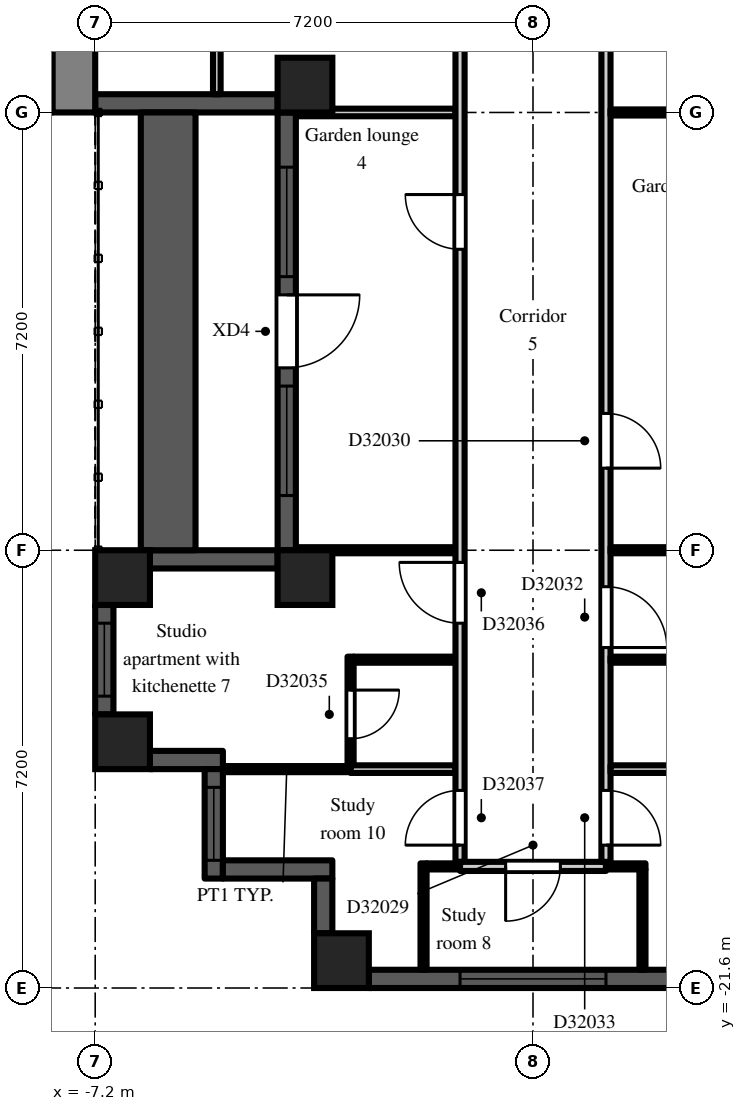
"""IFC4 building model, lengths in metres.
Left out: names, types, materials, properties, quantities, classifications, styles, units other than length and angle.
Written with IfcOpenShell. Run it as: python <this file> out.ifc"""

import sys

from ifc_helpers import new_model, si_unit, direction, frame, frame_2d, origin, origin_2d, place, context, subcontext, project, spatial, rectangle, extrude, element, fill, save


model = new_model("IFC4")
c1 = context("Model", 3, precision=1e-05, world=origin(), true_north=direction((0.0, 1.0)))
c2 = subcontext(c1, "Body", "Model", "MODEL_VIEW")
j1 = project(units=[si_unit("LENGTHUNIT", "METRE"), si_unit("PLANEANGLEUNIT", "RADIAN")], contexts=[c1])
p1 = place(None, origin())
s1 = spatial("IfcSite", under=j1, at=p1, CompositionType="ELEMENT")
p2 = place(p1, origin())
s2 = spatial("IfcBuilding", under=s1, at=p2, CompositionType="ELEMENT")
p3 = place(p2, frame((0.0, 0.0, 225.9)))
s3 = spatial("IfcBuildingStorey", under=s2, at=p3, CompositionType="ELEMENT", Elevation=225.9)
for number, where, z_axis, x_axis in (
    (1, (-6.75, -17.55, 0.0), (0.0, 0.0, 1.0), (1.0, 0.0, 0.0)),
    (2, (-6.75, -14.85, 0.0), (0.0, 0.0, 1.0), (1.0, 0.0, 0.0)),
    (3, (-3.75, -14.85, 0.0), (0.0, 0.0, 1.0), (1.0, 0.0, 0.0)),
    (4, (-3.75, -6.75, 0.0), (0.0, 0.0, 1.0), (1.0, 0.0, 0.0)),
    (5, (-3.15, -21.15, 0.0), (0.0, 0.0, 1.0), (1.0, 0.0, 0.0)),
):
    element("IfcColumn", number, at=place(p3, frame(where, z_axis=z_axis, x_axis=x_axis)), inside=s3, PredefinedType="COLUMN", context=c2, shape_type="SweptSolid", body=[
        extrude(rectangle(XDim=0.9, YDim=0.9, at=origin_2d()), origin(), (0.0, 0.0, 1.0), 3.0),
    ])
p4 = place(p3, frame((-7.2, -7.05, 0.0), z_axis=(0.0, 0.0, 1.0), x_axis=(1.0, 0.0, 0.0)))
e6 = element("IfcWall", 6, at=p4, inside=s3, PredefinedType="SOLIDWALL", context=c2, shape_type="SweptSolid", body=[
    extrude(rectangle(XDim=3.0, YDim=0.3, at=frame_2d((1.5, 0.0))), origin(), (0.0, 0.0, 1.0), 2.3),
])
p5 = place(p3, frame((-4.05, -7.2, 0.0), z_axis=(0.0, 0.0, 1.0), x_axis=(0.0, -1.0, 0.0)))
e7 = element("IfcWall", 7, at=p5, inside=s3, PredefinedType="SOLIDWALL", context=c2, shape_type="SweptSolid", body=[
    extrude(rectangle(XDim=7.2, YDim=0.3, at=frame_2d((3.6, 0.0))), origin(), (0.0, 0.0, 1.0), 2.3),
])
p6 = place(p5, frame((3.0, 0.0, 0.0)))
e8 = element("IfcOpeningElement", 8, at=p6, cuts=e7, PredefinedType="OPENING", context=c2, shape_type="SweptSolid", body=[
    extrude(rectangle(XDim=1.2, YDim=2.05, at=frame_2d((0.6, 1.025))), frame((0.0, 0.16, 0.0), z_axis=(0.0, -1.0, 0.0), x_axis=(1.0, 0.0, 0.0)), (0.0, 0.0, 1.0), 0.32),
])
p7 = place(p5, frame((0.9, 0.0, 0.2)))
e9 = element("IfcOpeningElement", 9, at=p7, cuts=e7, PredefinedType="OPENING", context=c2, shape_type="SweptSolid", body=[
    extrude(rectangle(XDim=1.8, YDim=1.85, at=frame_2d((0.9, 0.925))), frame((0.0, 0.16, 0.0), z_axis=(0.0, -1.0, 0.0), x_axis=(1.0, 0.0, 0.0)), (0.0, 0.0, 1.0), 0.32),
])
p8 = place(p5, frame((4.5, 0.0, 0.2)))
e10 = element("IfcOpeningElement", 10, at=p8, cuts=e7, PredefinedType="OPENING", context=c2, shape_type="SweptSolid", body=[
    extrude(rectangle(XDim=1.8, YDim=1.85, at=frame_2d((0.9, 0.925))), frame((0.0, 0.16, 0.0), z_axis=(0.0, -1.0, 0.0), x_axis=(1.0, 0.0, 0.0)), (0.0, 0.0, 1.0), 0.32),
])
p9 = place(p3, frame((-4.2, -14.55, 0.0), z_axis=(0.0, 0.0, 1.0), x_axis=(-1.0, 0.0, 0.0)))
e11 = element("IfcWall", 11, at=p9, inside=s3, PredefinedType="SOLIDWALL", context=c2, shape_type="SweptSolid", body=[
    extrude(rectangle(XDim=2.1, YDim=0.3, at=frame_2d((1.05, 0.0))), origin(), (0.0, 0.0, 1.0), 2.3),
])
p10 = place(p3, frame((-7.05, -15.3, 0.0), z_axis=(0.0, 0.0, 1.0), x_axis=(0.0, -1.0, 0.0)))
e12 = element("IfcWall", 12, at=p10, inside=s3, PredefinedType="SOLIDWALL", context=c2, shape_type="SweptSolid", body=[
    extrude(rectangle(XDim=1.8, YDim=0.3, at=frame_2d((0.9, 0.0))), origin(), (0.0, 0.0, 1.0), 2.3),
])
p11 = place(p10, frame((0.3, 0.0, 0.2)))
e13 = element("IfcOpeningElement", 13, at=p11, cuts=e12, PredefinedType="OPENING", context=c2, shape_type="SweptSolid", body=[
    extrude(rectangle(XDim=1.2, YDim=1.85, at=frame_2d((0.6, 0.925))), frame((0.0, 0.16, 0.0), z_axis=(0.0, -1.0, 0.0), x_axis=(1.0, 0.0, 0.0)), (0.0, 0.0, 1.0), 0.32),
])
p12 = place(p3, frame((-6.3, -17.85, 0.0), z_axis=(0.0, 0.0, 1.0), x_axis=(1.0, 0.0, 0.0)))
e14 = element("IfcWall", 14, at=p12, inside=s3, PredefinedType="SOLIDWALL", context=c2, shape_type="SweptSolid", body=[
    extrude(rectangle(XDim=1.2, YDim=0.3, at=frame_2d((0.6, 0.0))), origin(), (0.0, 0.0, 1.0), 2.6),
])
p13 = place(p3, frame((-5.25, -18.0, 0.0), z_axis=(0.0, 0.0, 1.0), x_axis=(0.0, -1.0, 0.0)))
e15 = element("IfcWall", 15, at=p13, inside=s3, PredefinedType="SOLIDWALL", context=c2, shape_type="SweptSolid", body=[
    extrude(rectangle(XDim=1.8, YDim=0.3, at=frame_2d((0.9, 0.0))), origin(), (0.0, 0.0, 1.0), 2.6),
])
p14 = place(p13, frame((0.3, 0.0, 0.2)))
e16 = element("IfcOpeningElement", 16, at=p14, cuts=e15, PredefinedType="OPENING", context=c2, shape_type="SweptSolid", body=[
    extrude(rectangle(XDim=1.2, YDim=1.85, at=frame_2d((0.6, 0.925))), frame((0.0, 0.16, 0.0), z_axis=(0.0, -1.0, 0.0), x_axis=(1.0, 0.0, 0.0)), (0.0, 0.0, 1.0), 0.32),
])
p15 = place(p3, frame((-5.1, -19.65, 0.0), z_axis=(0.0, 0.0, 1.0), x_axis=(1.0, 0.0, 0.0)))
e17 = element("IfcWall", 17, at=p15, inside=s3, PredefinedType="SOLIDWALL", context=c2, shape_type="SweptSolid", body=[
    extrude(rectangle(XDim=1.8, YDim=0.3, at=frame_2d((0.9, 0.0))), origin(), (0.0, 0.0, 1.0), 2.6),
])
p16 = place(p3, frame((-3.45, -19.8, 0.0), z_axis=(0.0, 0.0, 1.0), x_axis=(0.0, -1.0, 0.0)))
e18 = element("IfcWall", 18, at=p16, inside=s3, PredefinedType="SOLIDWALL", context=c2, shape_type="SweptSolid", body=[
    extrude(rectangle(XDim=0.9, YDim=0.3, at=frame_2d((0.45, 0.0))), origin(), (0.0, 0.0, 1.0), 2.6),
])
p17 = place(p3, frame((-2.7, -21.45, 0.0), z_axis=(0.0, 0.0, 1.0), x_axis=(1.0, 0.0, 0.0)))
e19 = element("IfcWall", 19, at=p17, inside=s3, PredefinedType="SOLIDWALL", context=c2, shape_type="SweptSolid", body=[
    extrude(rectangle(XDim=5.4, YDim=0.3, at=frame_2d((2.7, 0.0))), origin(), (0.0, 0.0, 1.0), 2.3),
])
p18 = place(p17, frame((1.5, 0.0, 0.2)))
e20 = element("IfcOpeningElement", 20, at=p18, cuts=e19, PredefinedType="OPENING", context=c2, shape_type="SweptSolid", body=[
    extrude(rectangle(XDim=2.4, YDim=1.85, at=frame_2d((1.2, 0.925))), frame((0.0, 0.16, 0.0), z_axis=(0.0, -1.0, 0.0), x_axis=(1.0, 0.0, 0.0)), (0.0, 0.0, 1.0), 0.32),
])
p19 = place(p3, frame((-6.0, -14.4, 0.0), z_axis=(0.0, 0.0, 1.0), x_axis=(0.0, 1.0, 0.0)))
e21 = element("IfcWall", 21, at=p19, inside=s3, PredefinedType="PARAPET", context=c2, shape_type="SweptSolid", body=[
    extrude(rectangle(XDim=7.2, YDim=0.9, at=frame_2d((3.6, 0.0))), origin(), (0.0, 0.0, 1.0), 0.8),
])
p20 = place(p3, frame((-7.55, -7.2, 0.0), z_axis=(0.0, 0.0, 1.0), x_axis=(0.0, 1.0, 0.0)))
e22 = element("IfcWall", 22, at=p20, inside=s3, PredefinedType="SHEAR", context=c2, shape_type="SweptSolid", body=[
    extrude(rectangle(XDim=14.4, YDim=0.7, at=frame_2d((7.2, 0.0))), origin(), (0.0, 0.0, 1.0), 2.6),
])
p21 = place(p20, frame((6.0, 0.0, 0.0)))
e23 = element("IfcOpeningElement", 23, at=p21, cuts=e22, PredefinedType="OPENING", context=c2, shape_type="SweptSolid", body=[
    extrude(rectangle(XDim=2.4, YDim=2.2, at=frame_2d((1.2, 1.1))), frame((0.0, 0.36, 0.0), z_axis=(0.0, -1.0, 0.0), x_axis=(1.0, 0.0, 0.0)), (0.0, 0.0, 1.0), 0.72),
])
p22 = place(p3, frame((-5.2, -6.9, 0.0), z_axis=(0.0, 0.0, 1.0), x_axis=(0.0, 1.0, 0.0)))
e24 = element("IfcWall", 24, at=p22, inside=s3, PredefinedType="PARTITIONING", context=c2, shape_type="SweptSolid", body=[
    extrude(rectangle(XDim=5.625, YDim=0.125, at=frame_2d((2.812, 0.0))), origin(), (0.0, 0.0, 1.0), 2.6),
])
p23 = place(p3, frame((-5.1, -18.0, 0.0), z_axis=(0.0, 0.0, 1.0), x_axis=(1.0, 0.0, 0.0)))
e25 = element("IfcWall", 25, at=p23, inside=s3, PredefinedType="PARTITIONING", context=c2, shape_type="SweptSolid", body=[
    extrude(rectangle(XDim=2.1, YDim=0.1, at=frame_2d((1.05, 0.0))), origin(), (0.0, 0.0, 1.0), 2.6),
])
p24 = place(p3, frame((-3.9, -14.4, 0.0), z_axis=(0.0, 0.0, 1.0), x_axis=(1.0, 0.0, 0.0)))
e26 = element("IfcWall", 26, at=p24, inside=s3, PredefinedType="PARTITIONING", context=c2, shape_type="SweptSolid", body=[
    extrude(rectangle(XDim=2.625, YDim=0.1, at=frame_2d((1.312, 0.0))), origin(), (0.0, 0.0, 1.0), 2.6),
])
p25 = place(p3, frame((-3.9, -7.2, 0.0), z_axis=(0.0, 0.0, 1.0), x_axis=(1.0, 0.0, 0.0)))
e27 = element("IfcWall", 27, at=p25, inside=s3, PredefinedType="PARTITIONING", context=c2, shape_type="SweptSolid", body=[
    extrude(rectangle(XDim=2.625, YDim=0.125, at=frame_2d((1.312, 0.0))), origin(), (0.0, 0.0, 1.0), 2.6),
])
p26 = place(p3, frame((-3.0, -17.938, 0.0), z_axis=(0.0, 0.0, 1.0), x_axis=(0.0, 1.0, 0.0)))
e28 = element("IfcWall", 28, at=p26, inside=s3, PredefinedType="PARTITIONING", context=c2, shape_type="SweptSolid", body=[
    extrude(rectangle(XDim=1.788, YDim=0.1, at=frame_2d((0.894, 0.0))), origin(), (0.0, 0.0, 1.0), 2.6),
])
p27 = place(p26, frame((0.438, 0.0, 0.0)))
e29 = element("IfcOpeningElement", 29, at=p27, cuts=e28, PredefinedType="OPENING", context=c2, shape_type="SweptSolid", body=[
    extrude(rectangle(XDim=0.8, YDim=2.1, at=frame_2d((0.4, 1.05))), frame((0.0, 0.06, 0.0), z_axis=(0.0, -1.0, 0.0), x_axis=(1.0, 0.0, 0.0)), (0.0, 0.0, 1.0), 0.12),
])
p28 = place(p3, frame((-3.0, -18.0, 0.0), z_axis=(0.0, 0.0, 1.0), x_axis=(1.0, 0.0, 0.0)))
e30 = element("IfcWall", 30, at=p28, inside=s3, PredefinedType="PARTITIONING", context=c2, shape_type="SweptSolid", body=[
    extrude(rectangle(XDim=1.725, YDim=0.125, at=frame_2d((0.863, 0.0))), origin(), (0.0, 0.0, 1.0), 2.6),
])
p29 = place(p3, frame((-2.95, -16.2, 0.0), z_axis=(0.0, 0.0, 1.0), x_axis=(1.0, 0.0, 0.0)))
e31 = element("IfcWall", 31, at=p29, inside=s3, PredefinedType="PARTITIONING", context=c2, shape_type="SweptSolid", body=[
    extrude(rectangle(XDim=1.675, YDim=0.1, at=frame_2d((0.837, 0.0))), origin(), (0.0, 0.0, 1.0), 2.6),
])
p30 = place(p3, frame((-1.8, -21.3, 0.0), z_axis=(0.0, 0.0, 1.0), x_axis=(0.0, 1.0, 0.0)))
e32 = element("IfcWall", 32, at=p30, inside=s3, PredefinedType="PARTITIONING", context=c2, shape_type="SweptSolid", body=[
    extrude(rectangle(XDim=1.75, YDim=0.1, at=frame_2d((0.875, 0.0))), origin(), (0.0, 0.0, 1.0), 2.6),
])
p31 = place(p3, frame((-1.75, -19.6, 0.0), z_axis=(0.0, 0.0, 1.0), x_axis=(1.0, 0.0, 0.0)))
e33 = element("IfcWall", 33, at=p31, inside=s3, PredefinedType="PARTITIONING", context=c2, shape_type="SweptSolid", body=[
    extrude(rectangle(XDim=0.55, YDim=0.1, at=frame_2d((0.275, 0.0))), origin(), (0.0, 0.0, 1.0), 2.6),
])
p32 = place(p3, frame((-1.2, -19.525, 0.0), z_axis=(0.0, 0.0, 1.0), x_axis=(0.0, 1.0, 0.0)))
e34 = element("IfcWall", 34, at=p32, inside=s3, PredefinedType="PARTITIONING", context=c2, shape_type="SweptSolid", body=[
    extrude(rectangle(XDim=18.25, YDim=0.15, at=frame_2d((9.125, 0.0))), origin(), (0.0, 0.0, 1.0), 2.6),
])
p33 = place(p32, frame((14.875, 0.0, 0.0)))
e35 = element("IfcOpeningElement", 35, at=p33, cuts=e34, PredefinedType="OPENING", context=c2, shape_type="SweptSolid", body=[
    extrude(rectangle(XDim=0.9, YDim=2.1, at=frame_2d((0.45, 1.05))), frame((0.0, 0.085, 0.0), z_axis=(0.0, -1.0, 0.0), x_axis=(1.0, 0.0, 0.0)), (0.0, 0.0, 1.0), 0.17),
])
p34 = place(p32, frame((10.075, 0.0, 0.0)))
e36 = element("IfcOpeningElement", 36, at=p34, cuts=e34, PredefinedType="OPENING", context=c2, shape_type="SweptSolid", body=[
    extrude(rectangle(XDim=0.9, YDim=2.1, at=frame_2d((0.45, 1.05))), frame((0.0, 0.085, 0.0), z_axis=(0.0, -1.0, 0.0), x_axis=(1.0, 0.0, 0.0)), (0.0, 0.0, 1.0), 0.17),
])
p35 = place(p32, frame((3.925, 0.0, 0.0)))
e37 = element("IfcOpeningElement", 37, at=p35, cuts=e34, PredefinedType="OPENING", context=c2, shape_type="SweptSolid", body=[
    extrude(rectangle(XDim=1.0, YDim=2.1, at=frame_2d((0.5, 1.05))), frame((0.0, 0.085, 0.0), z_axis=(0.0, -1.0, 0.0), x_axis=(1.0, 0.0, 0.0)), (0.0, 0.0, 1.0), 0.17),
])
p36 = place(p32, frame((0.275, 0.0, 0.0)))
e38 = element("IfcOpeningElement", 38, at=p36, cuts=e34, PredefinedType="OPENING", context=c2, shape_type="SweptSolid", body=[
    extrude(rectangle(XDim=0.9, YDim=2.1, at=frame_2d((0.45, 1.05))), frame((0.0, 0.085, 0.0), z_axis=(0.0, -1.0, 0.0), x_axis=(1.0, 0.0, 0.0)), (0.0, 0.0, 1.0), 0.17),
])
p37 = place(p3, frame((-1.2, -19.6, 0.0), z_axis=(0.0, 0.0, 1.0), x_axis=(1.0, 0.0, 0.0)))
e39 = element("IfcWall", 39, at=p37, inside=s3, PredefinedType="PARTITIONING", context=c2, shape_type="SweptSolid", body=[
    extrude(rectangle(XDim=2.4, YDim=0.15, at=frame_2d((1.2, 0.0))), origin(), (0.0, 0.0, 1.0), 2.6),
])
p38 = place(p37, frame((0.75, 0.0, 0.0)))
e40 = element("IfcOpeningElement", 40, at=p38, cuts=e39, PredefinedType="OPENING", context=c2, shape_type="SweptSolid", body=[
    extrude(rectangle(XDim=0.9, YDim=2.1, at=frame_2d((0.45, 1.05))), frame((0.0, 0.085, 0.0), z_axis=(0.0, -1.0, 0.0), x_axis=(1.0, 0.0, 0.0)), (0.0, 0.0, 1.0), 0.17),
])
p39 = place(p3, frame((1.2, -19.525, 0.0), z_axis=(0.0, 0.0, 1.0), x_axis=(0.0, 1.0, 0.0)))
e41 = element("IfcWall", 41, at=p39, inside=s3, PredefinedType="PARTITIONING", context=c2, shape_type="SweptSolid", body=[
    extrude(rectangle(XDim=18.4, YDim=0.15, at=frame_2d((9.2, 0.0))), origin(), (0.0, 0.0, 1.0), 2.6),
])
p40 = place(p39, frame((14.875, 0.0, 0.0)))
e42 = element("IfcOpeningElement", 42, at=p40, cuts=e41, PredefinedType="OPENING", context=c2, shape_type="SweptSolid", body=[
    extrude(rectangle(XDim=0.9, YDim=2.1, at=frame_2d((0.45, 1.05))), frame((0.0, 0.085, 0.0), z_axis=(0.0, -1.0, 0.0), x_axis=(1.0, 0.0, 0.0)), (0.0, 0.0, 1.0), 0.17),
])
p41 = place(p39, frame((6.475, 0.0, 0.0)))
e43 = element("IfcOpeningElement", 43, at=p41, cuts=e41, PredefinedType="OPENING", context=c2, shape_type="SweptSolid", body=[
    extrude(rectangle(XDim=0.9, YDim=2.1, at=frame_2d((0.45, 1.05))), frame((0.0, 0.085, 0.0), z_axis=(0.0, -1.0, 0.0), x_axis=(1.0, 0.0, 0.0)), (0.0, 0.0, 1.0), 0.17),
])
p42 = place(p39, frame((3.525, 0.0, 0.0)))
e44 = element("IfcOpeningElement", 44, at=p42, cuts=e41, PredefinedType="OPENING", context=c2, shape_type="SweptSolid", body=[
    extrude(rectangle(XDim=1.0, YDim=2.1, at=frame_2d((0.5, 1.05))), frame((0.0, 0.085, 0.0), z_axis=(0.0, -1.0, 0.0), x_axis=(1.0, 0.0, 0.0)), (0.0, 0.0, 1.0), 0.17),
])
p43 = place(p39, frame((0.275, 0.0, 0.0)))
e45 = element("IfcOpeningElement", 45, at=p43, cuts=e41, PredefinedType="OPENING", context=c2, shape_type="SweptSolid", body=[
    extrude(rectangle(XDim=0.9, YDim=2.1, at=frame_2d((0.45, 1.05))), frame((0.0, 0.085, 0.0), z_axis=(0.0, -1.0, 0.0), x_axis=(1.0, 0.0, 0.0)), (0.0, 0.0, 1.0), 0.17),
])
p44 = place(p3, frame((1.2, -19.6, 0.0), z_axis=(0.0, 0.0, 1.0), x_axis=(1.0, 0.0, 0.0)))
e46 = element("IfcWall", 46, at=p44, inside=s3, PredefinedType="PARTITIONING", context=c2, shape_type="SweptSolid", body=[
    extrude(rectangle(XDim=0.65, YDim=0.1, at=frame_2d((0.325, 0.0))), origin(), (0.0, 0.0, 1.0), 2.6),
])
p45 = place(p3, frame((1.275, -18.0, 0.0), z_axis=(0.0, 0.0, 1.0), x_axis=(1.0, 0.0, 0.0)))
e47 = element("IfcWall", 47, at=p45, inside=s3, PredefinedType="PARTITIONING", context=c2, shape_type="SweptSolid", body=[
    extrude(rectangle(XDim=1.725, YDim=0.125, at=frame_2d((0.863, 0.0))), origin(), (0.0, 0.0, 1.0), 2.6),
])
p46 = place(p3, frame((1.275, -16.2, 0.0), z_axis=(0.0, 0.0, 1.0), x_axis=(1.0, 0.0, 0.0)))
e48 = element("IfcWall", 48, at=p46, inside=s3, PredefinedType="PARTITIONING", context=c2, shape_type="SweptSolid", body=[
    extrude(rectangle(XDim=1.775, YDim=0.1, at=frame_2d((0.888, 0.0))), origin(), (0.0, 0.0, 1.0), 2.6),
])
for number, where, z_axis, x_axis in (
    (49, (1.275, -14.4, 0.0), (0.0, 0.0, 1.0), (1.0, 0.0, 0.0)),
    (50, (1.275, -7.2, 0.0), (0.0, 0.0, 1.0), (1.0, 0.0, 0.0)),
):
    element("IfcWall", number, at=place(p3, frame(where, z_axis=z_axis, x_axis=x_axis)), inside=s3, PredefinedType="PARTITIONING", context=c2, shape_type="SweptSolid", body=[
        extrude(rectangle(XDim=2.625, YDim=0.1, at=frame_2d((1.312, 0.0))), origin(), (0.0, 0.0, 1.0), 2.6),
    ])
p47 = place(p3, frame((1.8, -21.3, 0.0), z_axis=(0.0, 0.0, 1.0), x_axis=(0.0, 1.0, 0.0)))
e51 = element("IfcWall", 51, at=p47, inside=s3, PredefinedType="PARTITIONING", context=c2, shape_type="SweptSolid", body=[
    extrude(rectangle(XDim=1.65, YDim=0.1, at=frame_2d((0.825, 0.0))), origin(), (0.0, 0.0, 1.0), 2.6),
])
p48 = place(p6, origin())
e52 = element("IfcDoor", 52, at=p48, inside=s3, OperationType="SINGLE_SWING_LEFT", PredefinedType="DOOR", context=c2, shape_type="SweptSolid", body=[
    extrude(rectangle(XDim=1.2, YDim=2.05, at=frame_2d((0.6, 1.025))), frame((0.0, 0.025, 0.0), z_axis=(0.0, -1.0, 0.0), x_axis=(1.0, 0.0, 0.0)), (0.0, 0.0, 1.0), 0.05),
])
fill(e8, e52)
p49 = place(p7, origin())
e53 = element("IfcWindow", 53, at=p49, inside=s3, PartitioningType="SINGLE_PANEL", PredefinedType="WINDOW", context=c2, shape_type="SweptSolid", body=[
    extrude(rectangle(XDim=1.8, YDim=1.85, at=frame_2d((0.9, 0.925))), frame((0.0, 0.03, 0.0), z_axis=(0.0, -1.0, 0.0), x_axis=(1.0, 0.0, 0.0)), (0.0, 0.0, 1.0), 0.06),
])
fill(e9, e53)
p50 = place(p8, origin())
e54 = element("IfcWindow", 54, at=p50, inside=s3, PartitioningType="SINGLE_PANEL", PredefinedType="WINDOW", context=c2, shape_type="SweptSolid", body=[
    extrude(rectangle(XDim=1.8, YDim=1.85, at=frame_2d((0.9, 0.925))), frame((0.0, 0.03, 0.0), z_axis=(0.0, -1.0, 0.0), x_axis=(1.0, 0.0, 0.0)), (0.0, 0.0, 1.0), 0.06),
])
fill(e10, e54)
p51 = place(p11, origin())
e55 = element("IfcWindow", 55, at=p51, inside=s3, PartitioningType="SINGLE_PANEL", PredefinedType="WINDOW", context=c2, shape_type="SweptSolid", body=[
    extrude(rectangle(XDim=1.2, YDim=1.85, at=frame_2d((0.6, 0.925))), frame((0.0, 0.03, 0.0), z_axis=(0.0, -1.0, 0.0), x_axis=(1.0, 0.0, 0.0)), (0.0, 0.0, 1.0), 0.06),
])
fill(e13, e55)
p52 = place(p14, origin())
e56 = element("IfcWindow", 56, at=p52, inside=s3, PartitioningType="SINGLE_PANEL", PredefinedType="WINDOW", context=c2, shape_type="SweptSolid", body=[
    extrude(rectangle(XDim=1.2, YDim=1.85, at=frame_2d((0.6, 0.925))), frame((0.0, 0.03, 0.0), z_axis=(0.0, -1.0, 0.0), x_axis=(1.0, 0.0, 0.0)), (0.0, 0.0, 1.0), 0.06),
])
fill(e16, e56)
p53 = place(p18, origin())
e57 = element("IfcWindow", 57, at=p53, inside=s3, PartitioningType="SINGLE_PANEL", PredefinedType="WINDOW", context=c2, shape_type="SweptSolid", body=[
    extrude(rectangle(XDim=2.4, YDim=1.85, at=frame_2d((1.2, 0.925))), frame((0.0, 0.03, 0.0), z_axis=(0.0, -1.0, 0.0), x_axis=(1.0, 0.0, 0.0)), (0.0, 0.0, 1.0), 0.06),
])
fill(e20, e57)
p54 = place(p38, frame((0.9, 0.0, 0.0), z_axis=(0.0, 0.0, 1.0), x_axis=(-1.0, 0.0, 0.0)))
e58 = element("IfcDoor", 58, at=p54, inside=s3, OperationType="SINGLE_SWING_RIGHT", PredefinedType="DOOR", context=c2, shape_type="SweptSolid", body=[
    extrude(rectangle(XDim=0.9, YDim=2.1, at=frame_2d((0.45, 1.05))), frame((0.0, 0.025, 0.0), z_axis=(0.0, -1.0, 0.0), x_axis=(1.0, 0.0, 0.0)), (0.0, 0.0, 1.0), 0.05),
])
fill(e40, e58)
p55 = place(p41, frame((0.9, 0.0, 0.0), z_axis=(0.0, 0.0, 1.0), x_axis=(-1.0, 0.0, 0.0)))
e59 = element("IfcDoor", 59, at=p55, inside=s3, OperationType="SINGLE_SWING_RIGHT", PredefinedType="DOOR", context=c2, shape_type="SweptSolid", body=[
    extrude(rectangle(XDim=0.9, YDim=2.1, at=frame_2d((0.45, 1.05))), frame((0.0, 0.025, 0.0), z_axis=(0.0, -1.0, 0.0), x_axis=(1.0, 0.0, 0.0)), (0.0, 0.0, 1.0), 0.05),
])
fill(e43, e59)
p56 = place(p42, frame((1.0, 0.0, 0.0), z_axis=(0.0, 0.0, 1.0), x_axis=(-1.0, 0.0, 0.0)))
e60 = element("IfcDoor", 60, at=p56, inside=s3, OperationType="SINGLE_SWING_RIGHT", PredefinedType="DOOR", context=c2, shape_type="SweptSolid", body=[
    extrude(rectangle(XDim=1.0, YDim=2.1, at=frame_2d((0.5, 1.05))), frame((0.0, 0.025, 0.0), z_axis=(0.0, -1.0, 0.0), x_axis=(1.0, 0.0, 0.0)), (0.0, 0.0, 1.0), 0.05),
])
fill(e44, e60)
p57 = place(p43, frame((0.9, 0.0, 0.0), z_axis=(0.0, 0.0, 1.0), x_axis=(-1.0, 0.0, 0.0)))
e61 = element("IfcDoor", 61, at=p57, inside=s3, OperationType="SINGLE_SWING_RIGHT", PredefinedType="DOOR", context=c2, shape_type="SweptSolid", body=[
    extrude(rectangle(XDim=0.9, YDim=2.1, at=frame_2d((0.45, 1.05))), frame((0.0, 0.025, 0.0), z_axis=(0.0, -1.0, 0.0), x_axis=(1.0, 0.0, 0.0)), (0.0, 0.0, 1.0), 0.05),
])
fill(e45, e61)
p58 = place(p34, origin())
e62 = element("IfcDoor", 62, at=p58, inside=s3, OperationType="SINGLE_SWING_RIGHT", PredefinedType="DOOR", context=c2, shape_type="SweptSolid", body=[
    extrude(rectangle(XDim=0.9, YDim=2.1, at=frame_2d((0.45, 1.05))), frame((0.0, 0.025, 0.0), z_axis=(0.0, -1.0, 0.0), x_axis=(1.0, 0.0, 0.0)), (0.0, 0.0, 1.0), 0.05),
])
fill(e36, e62)
p59 = place(p27, frame((0.8, 0.0, 0.0), z_axis=(0.0, 0.0, 1.0), x_axis=(-1.0, 0.0, 0.0)))
e63 = element("IfcDoor", 63, at=p59, inside=s3, OperationType="SINGLE_SWING_LEFT", PredefinedType="DOOR", context=c2, shape_type="SweptSolid", body=[
    extrude(rectangle(XDim=0.8, YDim=2.1, at=frame_2d((0.4, 1.05))), frame((0.0, 0.025, 0.0), z_axis=(0.0, -1.0, 0.0), x_axis=(1.0, 0.0, 0.0)), (0.0, 0.0, 1.0), 0.05),
])
fill(e29, e63)
p60 = place(p35, origin())
e64 = element("IfcDoor", 64, at=p60, inside=s3, OperationType="SINGLE_SWING_RIGHT", PredefinedType="DOOR", context=c2, shape_type="SweptSolid", body=[
    extrude(rectangle(XDim=1.0, YDim=2.1, at=frame_2d((0.5, 1.05))), frame((0.0, 0.025, 0.0), z_axis=(0.0, -1.0, 0.0), x_axis=(1.0, 0.0, 0.0)), (0.0, 0.0, 1.0), 0.05),
])
fill(e37, e64)
p61 = place(p36, origin())
e65 = element("IfcDoor", 65, at=p61, inside=s3, OperationType="SINGLE_SWING_LEFT", PredefinedType="DOOR", context=c2, shape_type="SweptSolid", body=[
    extrude(rectangle(XDim=0.9, YDim=2.1, at=frame_2d((0.45, 1.05))), frame((0.0, 0.025, 0.0), z_axis=(0.0, -1.0, 0.0), x_axis=(1.0, 0.0, 0.0)), (0.0, 0.0, 1.0), 0.05),
])
fill(e38, e65)
save(model, sys.argv[1])
